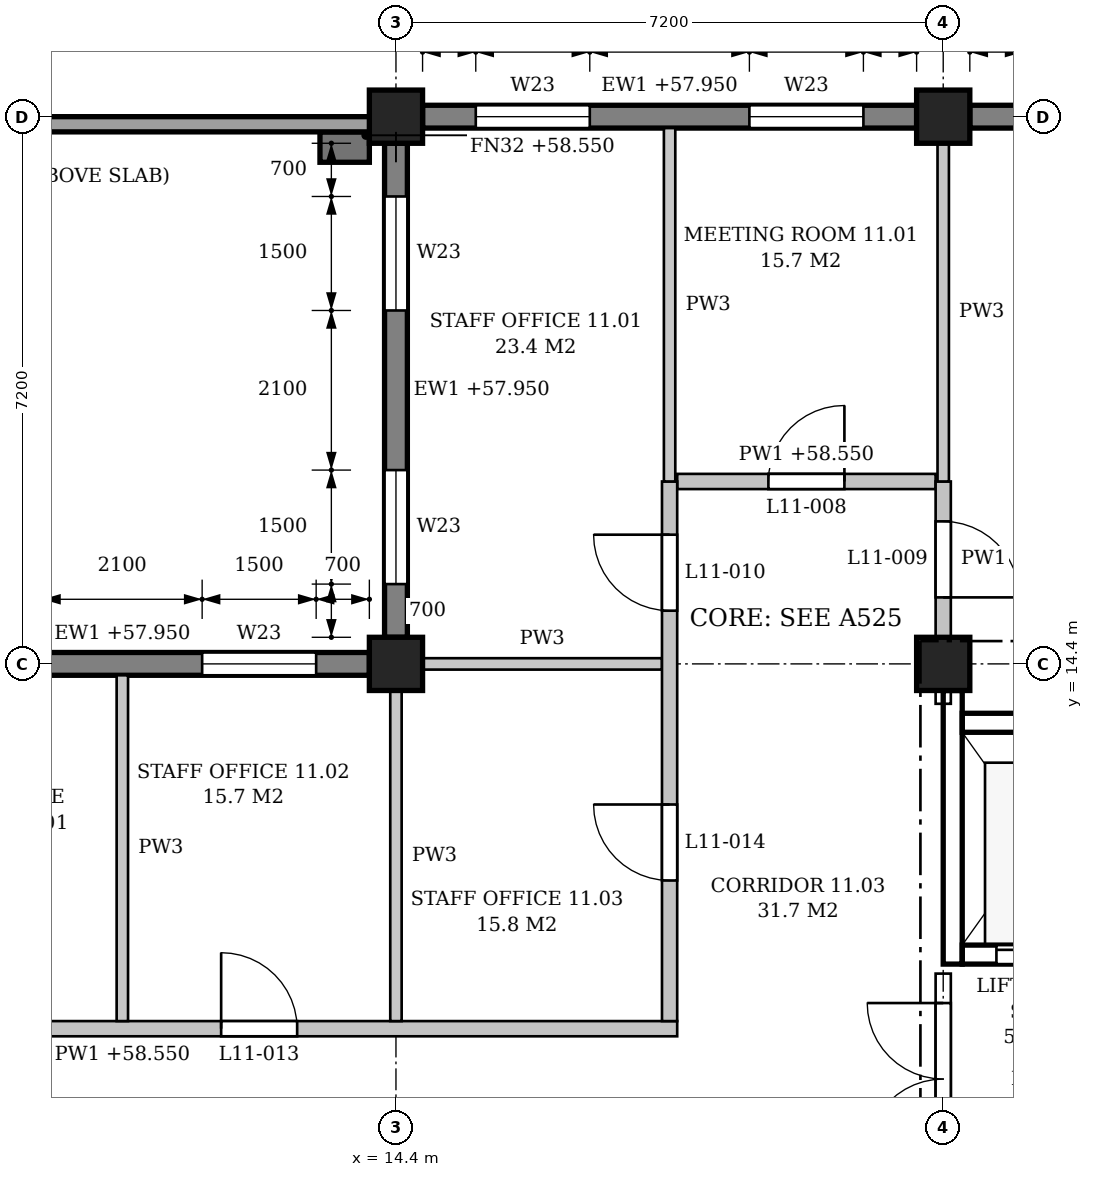
"""IFC4 building model, lengths in metres.
Left out: names, types, materials, properties, quantities, classifications, styles, units other than length and angle.
Written with IfcOpenShell. Run it as: python <this file> out.ifc"""

import sys

from ifc_helpers import new_model, si_unit, direction, frame, frame_2d, origin, origin_2d, place, context, subcontext, project, spatial, polyline, rectangle, outline, extrude, element, fill, save


model = new_model("IFC4")
c1 = context("Model", 3, precision=1e-05, world=origin(), true_north=direction((0.0, 1.0)))
c2 = subcontext(c1, "Body", "Model", "MODEL_VIEW")
j1 = project(units=[si_unit("LENGTHUNIT", "METRE"), si_unit("PLANEANGLEUNIT", "RADIAN")], contexts=[c1])
p1 = place(None, origin())
s1 = spatial("IfcSite", under=j1, at=p1, CompositionType="ELEMENT")
p2 = place(p1, origin())
s2 = spatial("IfcBuilding", under=s1, at=p2, CompositionType="ELEMENT")
p3 = place(p2, frame((0.0, 0.0, 54.3)))
s3 = spatial("IfcBuildingStorey", under=s2, at=p3, CompositionType="ELEMENT", Elevation=54.3)
for number, where, z_axis, x_axis in (
    (1, (14.4, 14.4, 0.0), (0.0, 0.0, 1.0), (1.0, 0.0, 0.0)),
    (2, (14.4, 21.6, 0.0), (0.0, 0.0, 1.0), (1.0, 0.0, 0.0)),
    (3, (21.6, 14.4, 0.0), (0.0, 0.0, 1.0), (1.0, 0.0, 0.0)),
    (4, (21.6, 21.6, 0.0), (0.0, 0.0, 1.0), (1.0, 0.0, 0.0)),
):
    element("IfcColumn", number, at=place(p3, frame(where, z_axis=z_axis, x_axis=x_axis)), inside=s3, PredefinedType="COLUMN", context=c2, shape_type="SweptSolid", body=[
        extrude(rectangle(XDim=0.7, YDim=0.7, at=origin_2d()), origin(), (0.0, 0.0, 1.0), 4.5),
    ])
p4 = place(p3, frame((0.2, 21.5, 0.0), z_axis=(0.0, 0.0, 1.0), x_axis=(1.0, 0.0, 0.0)))
e5 = element("IfcWall", 5, at=p4, inside=s3, PredefinedType="STANDARD", context=c2, shape_type="SweptSolid", body=[
    extrude(rectangle(XDim=14.05, YDim=0.2, at=frame_2d((7.025, 0.0))), origin(), (0.0, 0.0, 1.0), 0.15),
])
p5 = place(p3, frame((28.45, 21.6, 0.0), z_axis=(0.0, 0.0, 1.0), x_axis=(-1.0, 0.0, 0.0)))
e6 = element("IfcWall", 6, at=p5, inside=s3, PredefinedType="STANDARD", context=c2, shape_type="SweptSolid", body=[
    extrude(rectangle(XDim=6.5, YDim=0.3, at=frame_2d((3.25, 0.0))), origin(), (0.0, 0.0, 1.0), 3.65),
])
p6 = place(p5, frame((0.7, 0.0, 0.9)))
e7 = element("IfcOpeningElement", 7, at=p6, cuts=e6, PredefinedType="OPENING", context=c2, shape_type="SweptSolid", body=[
    extrude(outline(polyline([(0.0, 0.0), (1.5, 0.0), (1.5, 1.95), (0.75, 2.7), (0.0, 1.95), (0.0, 0.0)])), frame((0.0, 0.16, 0.0), z_axis=(0.0, -1.0, 0.0), x_axis=(1.0, 0.0, 0.0)), (0.0, 0.0, 1.0), 0.32),
])
p7 = place(p5, frame((4.3, 0.0, 0.9)))
e8 = element("IfcOpeningElement", 8, at=p7, cuts=e6, PredefinedType="OPENING", context=c2, shape_type="SweptSolid", body=[
    extrude(outline(polyline([(0.0, 0.0), (1.5, 0.0), (1.5, 1.95), (0.75, 2.7), (0.0, 1.95), (0.0, 0.0)])), frame((0.0, 0.16, 0.0), z_axis=(0.0, -1.0, 0.0), x_axis=(1.0, 0.0, 0.0)), (0.0, 0.0, 1.0), 0.32),
])
p8 = place(p3, frame((21.25, 21.6, 0.0), z_axis=(0.0, 0.0, 1.0), x_axis=(-1.0, 0.0, 0.0)))
e9 = element("IfcWall", 9, at=p8, inside=s3, PredefinedType="STANDARD", context=c2, shape_type="SweptSolid", body=[
    extrude(rectangle(XDim=6.5, YDim=0.3, at=frame_2d((3.25, 0.0))), origin(), (0.0, 0.0, 1.0), 3.65),
])
p9 = place(p8, frame((0.7, 0.0, 0.9)))
e10 = element("IfcOpeningElement", 10, at=p9, cuts=e9, PredefinedType="OPENING", context=c2, shape_type="SweptSolid", body=[
    extrude(outline(polyline([(0.0, 0.0), (1.5, 0.0), (1.5, 1.95), (0.75, 2.7), (0.0, 1.95), (0.0, 0.0)])), frame((0.0, 0.16, 0.0), z_axis=(0.0, -1.0, 0.0), x_axis=(1.0, 0.0, 0.0)), (0.0, 0.0, 1.0), 0.32),
])
p10 = place(p8, frame((4.3, 0.0, 0.9)))
e11 = element("IfcOpeningElement", 11, at=p10, cuts=e9, PredefinedType="OPENING", context=c2, shape_type="SweptSolid", body=[
    extrude(outline(polyline([(0.0, 0.0), (1.5, 0.0), (1.5, 1.95), (0.75, 2.7), (0.0, 1.95), (0.0, 0.0)])), frame((0.0, 0.16, 0.0), z_axis=(0.0, -1.0, 0.0), x_axis=(1.0, 0.0, 0.0)), (0.0, 0.0, 1.0), 0.32),
])
p11 = place(p3, frame((14.05, 14.4, 0.0), z_axis=(0.0, 0.0, 1.0), x_axis=(-1.0, 0.0, 0.0)))
e12 = element("IfcWall", 12, at=p11, inside=s3, PredefinedType="STANDARD", context=c2, shape_type="SweptSolid", body=[
    extrude(rectangle(XDim=6.5, YDim=0.3, at=frame_2d((3.25, 0.0))), origin(), (0.0, 0.0, 1.0), 3.65),
])
p12 = place(p11, frame((0.7, 0.0, 0.9)))
e13 = element("IfcOpeningElement", 13, at=p12, cuts=e12, PredefinedType="OPENING", context=c2, shape_type="SweptSolid", body=[
    extrude(outline(polyline([(0.0, 0.0), (1.5, 0.0), (1.5, 1.95), (0.75, 2.7), (0.0, 1.95), (0.0, 0.0)])), frame((0.0, 0.16, 0.0), z_axis=(0.0, -1.0, 0.0), x_axis=(1.0, 0.0, 0.0)), (0.0, 0.0, 1.0), 0.32),
])
p13 = place(p11, frame((4.3, 0.0, 0.9)))
e14 = element("IfcOpeningElement", 14, at=p13, cuts=e12, PredefinedType="OPENING", context=c2, shape_type="SweptSolid", body=[
    extrude(outline(polyline([(0.0, 0.0), (1.5, 0.0), (1.5, 1.95), (0.75, 2.7), (0.0, 1.95), (0.0, 0.0)])), frame((0.0, 0.16, 0.0), z_axis=(0.0, -1.0, 0.0), x_axis=(1.0, 0.0, 0.0)), (0.0, 0.0, 1.0), 0.32),
])
p14 = place(p3, frame((14.4, 14.75, 0.0), z_axis=(0.0, 0.0, 1.0), x_axis=(0.0, 1.0, 0.0)))
e15 = element("IfcWall", 15, at=p14, inside=s3, PredefinedType="STANDARD", context=c2, shape_type="SweptSolid", body=[
    extrude(rectangle(XDim=6.5, YDim=0.3, at=frame_2d((3.25, 0.0))), origin(), (0.0, 0.0, 1.0), 3.65),
])
p15 = place(p14, frame((0.7, 0.0, 0.9)))
e16 = element("IfcOpeningElement", 16, at=p15, cuts=e15, PredefinedType="OPENING", context=c2, shape_type="SweptSolid", body=[
    extrude(outline(polyline([(0.0, 0.0), (1.5, 0.0), (1.5, 1.95), (0.75, 2.7), (0.0, 1.95), (0.0, 0.0)])), frame((0.0, 0.16, 0.0), z_axis=(0.0, -1.0, 0.0), x_axis=(1.0, 0.0, 0.0)), (0.0, 0.0, 1.0), 0.32),
])
p16 = place(p14, frame((4.3, 0.0, 0.9)))
e17 = element("IfcOpeningElement", 17, at=p16, cuts=e15, PredefinedType="OPENING", context=c2, shape_type="SweptSolid", body=[
    extrude(outline(polyline([(0.0, 0.0), (1.5, 0.0), (1.5, 1.95), (0.75, 2.7), (0.0, 1.95), (0.0, 0.0)])), frame((0.0, 0.16, 0.0), z_axis=(0.0, -1.0, 0.0), x_axis=(1.0, 0.0, 0.0)), (0.0, 0.0, 1.0), 0.32),
])
p17 = place(p3, frame((14.05, 21.2, 0.0), z_axis=(0.0, 0.0, 1.0), x_axis=(-1.0, 0.0, 0.0)))
e18 = element("IfcWall", 18, at=p17, inside=s3, PredefinedType="POLYGONAL", context=c2, shape_type="SweptSolid", body=[
    extrude(outline(polyline([(0.65, 0.0), (0.65, 4.025), (0.5, 4.25), (0.0, 4.25), (0.0, 0.0), (0.65, 0.0)])), frame((0.0, 0.2, 0.0), z_axis=(0.0, -1.0, 0.0), x_axis=(1.0, 0.0, 0.0)), (0.0, 0.0, 1.0), 0.4),
])
p18 = place(p3, frame((21.725, 10.45, -0.25), z_axis=(0.0, 0.0, 1.0), x_axis=(0.0, 1.0, 0.0)))
e19 = element("IfcWall", 19, at=p18, inside=s3, PredefinedType="SHEAR", context=c2, shape_type="SweptSolid", body=[
    extrude(rectangle(XDim=3.6, YDim=0.25, at=frame_2d((1.8, 0.0))), origin(), (0.0, 0.0, 1.0), 3.8),
])
p19 = place(p3, frame((21.85, 10.575, -0.25), z_axis=(0.0, 0.0, 1.0), x_axis=(1.0, 0.0, 0.0)))
e20 = element("IfcWall", 20, at=p19, inside=s3, PredefinedType="SHEAR", context=c2, shape_type="SweptSolid", body=[
    extrude(rectangle(XDim=2.0, YDim=0.25, at=frame_2d((1.0, 0.0))), origin(), (0.0, 0.0, 1.0), 4.5),
])
p20 = place(p19, frame((0.45, 0.0, 0.25)))
e21 = element("IfcOpeningElement", 21, at=p20, cuts=e20, PredefinedType="OPENING", context=c2, shape_type="SweptSolid", body=[
    extrude(rectangle(XDim=1.1, YDim=2.1, at=frame_2d((0.55, 1.05))), frame((0.0, 0.135, 0.0), z_axis=(0.0, -1.0, 0.0), x_axis=(1.0, 0.0, 0.0)), (0.0, 0.0, 1.0), 0.27),
])
p21 = place(p3, frame((21.85, 13.625, -0.25), z_axis=(0.0, 0.0, 1.0), x_axis=(1.0, 0.0, 0.0)))
e22 = element("IfcWall", 22, at=p21, inside=s3, PredefinedType="SHEAR", context=c2, shape_type="SweptSolid", body=[
    extrude(rectangle(XDim=2.0, YDim=0.25, at=frame_2d((1.0, 0.0))), origin(), (0.0, 0.0, 1.0), 4.5),
])
p22 = place(p3, frame((3.5, 9.6, 0.0), z_axis=(0.0, 0.0, 1.0), x_axis=(1.0, 0.0, 0.0)))
e23 = element("IfcWall", 23, at=p22, inside=s3, PredefinedType="PARTITIONING", context=c2, shape_type="SweptSolid", body=[
    extrude(outline(polyline([(0.0, 0.0), (14.6, 0.0), (14.6, 4.25), (11.125, 4.25), (11.125, 3.55), (10.675, 3.55), (10.675, 4.25), (3.925, 4.25), (3.925, 3.55), (3.475, 3.55), (3.475, 4.25), (0.0, 4.25), (0.0, 0.0)])), frame((0.0, 0.1, 0.0), z_axis=(0.0, -1.0, 0.0), x_axis=(1.0, 0.0, 0.0)), (0.0, 0.0, 1.0), 0.2),
])
p23 = place(p22, frame((2.7, 0.0, 0.0)))
e24 = element("IfcOpeningElement", 24, at=p23, cuts=e23, PredefinedType="OPENING", context=c2, shape_type="SweptSolid", body=[
    extrude(rectangle(XDim=2.0, YDim=2.1, at=frame_2d((1.0, 1.05))), frame((0.0, 0.11, 0.0), z_axis=(0.0, -1.0, 0.0), x_axis=(1.0, 0.0, 0.0)), (0.0, 0.0, 1.0), 0.22),
])
p24 = place(p22, frame((8.6, 0.0, 0.0)))
e25 = element("IfcOpeningElement", 25, at=p24, cuts=e23, PredefinedType="OPENING", context=c2, shape_type="SweptSolid", body=[
    extrude(rectangle(XDim=1.0, YDim=2.1, at=frame_2d((0.5, 1.05))), frame((0.0, 0.11, 0.0), z_axis=(0.0, -1.0, 0.0), x_axis=(1.0, 0.0, 0.0)), (0.0, 0.0, 1.0), 0.22),
])
p25 = place(p3, frame((14.75, 14.4, 0.0), z_axis=(0.0, 0.0, 1.0), x_axis=(1.0, 0.0, 0.0)))
e26 = element("IfcWall", 26, at=p25, inside=s3, PredefinedType="PARTITIONING", context=c2, shape_type="SweptSolid", body=[
    extrude(rectangle(XDim=3.15, YDim=0.15, at=frame_2d((1.575, 0.0))), origin(), (0.0, 0.0, 1.0), 3.55),
])
p26 = place(p3, frame((18.1, 16.8, 0.0), z_axis=(0.0, 0.0, 1.0), x_axis=(1.0, 0.0, 0.0)))
e27 = element("IfcWall", 27, at=p26, inside=s3, PredefinedType="PARTITIONING", context=c2, shape_type="SweptSolid", body=[
    extrude(outline(polyline([(0.0, 0.0), (3.4, 0.0), (3.4, 3.55), (3.275, 3.55), (3.275, 4.25), (0.0, 4.25), (0.0, 0.0)])), frame((0.0, 0.1, 0.0), z_axis=(0.0, -1.0, 0.0), x_axis=(1.0, 0.0, 0.0)), (0.0, 0.0, 1.0), 0.2),
])
p27 = place(p26, frame((1.2, 0.0, 0.0)))
e28 = element("IfcOpeningElement", 28, at=p27, cuts=e27, PredefinedType="OPENING", context=c2, shape_type="SweptSolid", body=[
    extrude(rectangle(XDim=1.0, YDim=2.1, at=frame_2d((0.5, 1.05))), frame((0.0, 0.11, 0.0), z_axis=(0.0, -1.0, 0.0), x_axis=(1.0, 0.0, 0.0)), (0.0, 0.0, 1.0), 0.22),
])
p28 = place(p3, frame((10.8, 9.7, 0.0), z_axis=(0.0, 0.0, 1.0), x_axis=(0.0, 1.0, 0.0)))
e29 = element("IfcWall", 29, at=p28, inside=s3, PredefinedType="PARTITIONING", context=c2, shape_type="SweptSolid", body=[
    extrude(rectangle(XDim=4.55, YDim=0.15, at=frame_2d((2.275, 0.0))), origin(), (0.0, 0.0, 1.0), 3.55),
])
p29 = place(p3, frame((14.4, 9.7, 0.0), z_axis=(0.0, 0.0, 1.0), x_axis=(0.0, 1.0, 0.0)))
e30 = element("IfcWall", 30, at=p29, inside=s3, PredefinedType="PARTITIONING", context=c2, shape_type="SweptSolid", body=[
    extrude(rectangle(XDim=4.35, YDim=0.15, at=frame_2d((2.175, 0.0))), origin(), (0.0, 0.0, 1.0), 3.55),
])
p30 = place(p3, frame((18.0, 9.7, 0.0), z_axis=(0.0, 0.0, 1.0), x_axis=(0.0, 1.0, 0.0)))
e31 = element("IfcWall", 31, at=p30, inside=s3, PredefinedType="PARTITIONING", context=c2, shape_type="SweptSolid", body=[
    extrude(outline(polyline([(0.0, 0.0), (7.1, 0.0), (7.1, 4.25), (4.925, 4.25), (4.925, 3.55), (4.475, 3.55), (4.475, 4.25), (0.0, 4.25), (0.0, 0.0)])), frame((0.0, 0.1, 0.0), z_axis=(0.0, -1.0, 0.0), x_axis=(1.0, 0.0, 0.0)), (0.0, 0.0, 1.0), 0.2),
])
p31 = place(p30, frame((5.4, 0.0, 0.0)))
e32 = element("IfcOpeningElement", 32, at=p31, cuts=e31, PredefinedType="OPENING", context=c2, shape_type="SweptSolid", body=[
    extrude(rectangle(XDim=1.0, YDim=2.1, at=frame_2d((0.5, 1.05))), frame((0.0, 0.11, 0.0), z_axis=(0.0, -1.0, 0.0), x_axis=(1.0, 0.0, 0.0)), (0.0, 0.0, 1.0), 0.22),
])
p32 = place(p30, frame((1.85, 0.0, 0.0)))
e33 = element("IfcOpeningElement", 33, at=p32, cuts=e31, PredefinedType="OPENING", context=c2, shape_type="SweptSolid", body=[
    extrude(rectangle(XDim=1.0, YDim=2.1, at=frame_2d((0.5, 1.05))), frame((0.0, 0.11, 0.0), z_axis=(0.0, -1.0, 0.0), x_axis=(1.0, 0.0, 0.0)), (0.0, 0.0, 1.0), 0.22),
])
p33 = place(p3, frame((18.0, 16.8, 0.0), z_axis=(0.0, 0.0, 1.0), x_axis=(0.0, 1.0, 0.0)))
e34 = element("IfcWall", 34, at=p33, inside=s3, PredefinedType="PARTITIONING", context=c2, shape_type="SweptSolid", body=[
    extrude(rectangle(XDim=4.65, YDim=0.15, at=frame_2d((2.325, 0.0))), origin(), (0.0, 0.0, 1.0), 3.55),
])
p34 = place(p3, frame((21.6, 7.55, 0.0), z_axis=(0.0, 0.0, 1.0), x_axis=(0.0, 1.0, 0.0)))
e35 = element("IfcWall", 35, at=p34, inside=s3, PredefinedType="PARTITIONING", context=c2, shape_type="SweptSolid", body=[
    extrude(rectangle(XDim=2.775, YDim=0.2, at=frame_2d((1.387, 0.0))), origin(), (0.0, 0.0, 1.0), 3.55),
])
p35 = place(p34, frame((0.387, 0.0, 0.0)))
e36 = element("IfcOpeningElement", 36, at=p35, cuts=e35, PredefinedType="OPENING", context=c2, shape_type="SweptSolid", body=[
    extrude(rectangle(XDim=2.0, YDim=2.4, at=frame_2d((1.0, 1.2))), frame((0.0, 0.11, 0.0), z_axis=(0.0, -1.0, 0.0), x_axis=(1.0, 0.0, 0.0)), (0.0, 0.0, 1.0), 0.22),
])
p36 = place(p3, frame((21.6, 13.875, 0.0), z_axis=(0.0, 0.0, 1.0), x_axis=(0.0, 1.0, 0.0)))
e37 = element("IfcWall", 37, at=p36, inside=s3, PredefinedType="PARTITIONING", context=c2, shape_type="SweptSolid", body=[
    extrude(rectangle(XDim=0.175, YDim=0.2, at=frame_2d((0.087, 0.0))), origin(), (0.0, 0.0, 1.0), 3.55),
])
p37 = place(p3, frame((21.6, 14.75, 0.0), z_axis=(0.0, 0.0, 1.0), x_axis=(0.0, 1.0, 0.0)))
e38 = element("IfcWall", 38, at=p37, inside=s3, PredefinedType="PARTITIONING", context=c2, shape_type="SweptSolid", body=[
    extrude(rectangle(XDim=2.05, YDim=0.2, at=frame_2d((1.025, 0.0))), origin(), (0.0, 0.0, 1.0), 3.55),
])
p38 = place(p37, frame((0.525, 0.0, 0.0)))
e39 = element("IfcOpeningElement", 39, at=p38, cuts=e38, PredefinedType="OPENING", context=c2, shape_type="SweptSolid", body=[
    extrude(rectangle(XDim=1.0, YDim=2.1, at=frame_2d((0.5, 1.05))), frame((0.0, 0.11, 0.0), z_axis=(0.0, -1.0, 0.0), x_axis=(1.0, 0.0, 0.0)), (0.0, 0.0, 1.0), 0.22),
])
p39 = place(p3, frame((21.6, 16.8, 0.0), z_axis=(0.0, 0.0, 1.0), x_axis=(0.0, 1.0, 0.0)))
e40 = element("IfcWall", 40, at=p39, inside=s3, PredefinedType="PARTITIONING", context=c2, shape_type="SweptSolid", body=[
    extrude(rectangle(XDim=4.45, YDim=0.15, at=frame_2d((2.225, 0.0))), origin(), (0.0, 0.0, 1.0), 3.55),
])
p40 = place(p9, origin())
e41 = element("IfcWindow", 41, at=p40, inside=s3, PartitioningType="SINGLE_PANEL", PredefinedType="WINDOW", context=c2, shape_type="SweptSolid", body=[
    extrude(outline(polyline([(0.0, 0.0), (1.5, 0.0), (1.5, 1.95), (0.75, 2.7), (0.0, 1.95), (0.0, 0.0)])), frame((0.0, 0.03, 0.0), z_axis=(0.0, -1.0, 0.0), x_axis=(1.0, 0.0, 0.0)), (0.0, 0.0, 1.0), 0.06),
])
fill(e10, e41)
p41 = place(p10, origin())
e42 = element("IfcWindow", 42, at=p41, inside=s3, PartitioningType="SINGLE_PANEL", PredefinedType="WINDOW", context=c2, shape_type="SweptSolid", body=[
    extrude(outline(polyline([(0.0, 0.0), (1.5, 0.0), (1.5, 1.95), (0.75, 2.7), (0.0, 1.95), (0.0, 0.0)])), frame((0.0, 0.03, 0.0), z_axis=(0.0, -1.0, 0.0), x_axis=(1.0, 0.0, 0.0)), (0.0, 0.0, 1.0), 0.06),
])
fill(e11, e42)
p42 = place(p12, origin())
e43 = element("IfcWindow", 43, at=p42, inside=s3, PartitioningType="SINGLE_PANEL", PredefinedType="WINDOW", context=c2, shape_type="SweptSolid", body=[
    extrude(outline(polyline([(0.0, 0.0), (1.5, 0.0), (1.5, 1.95), (0.75, 2.7), (0.0, 1.95), (0.0, 0.0)])), frame((0.0, 0.03, 0.0), z_axis=(0.0, -1.0, 0.0), x_axis=(1.0, 0.0, 0.0)), (0.0, 0.0, 1.0), 0.06),
])
fill(e13, e43)
p43 = place(p15, origin())
e44 = element("IfcWindow", 44, at=p43, inside=s3, PartitioningType="SINGLE_PANEL", PredefinedType="WINDOW", context=c2, shape_type="SweptSolid", body=[
    extrude(outline(polyline([(0.0, 0.0), (1.5, 0.0), (1.5, 1.95), (0.75, 2.7), (0.0, 1.95), (0.0, 0.0)])), frame((0.0, 0.03, 0.0), z_axis=(0.0, -1.0, 0.0), x_axis=(1.0, 0.0, 0.0)), (0.0, 0.0, 1.0), 0.06),
])
fill(e16, e44)
p44 = place(p16, origin())
e45 = element("IfcWindow", 45, at=p44, inside=s3, PartitioningType="SINGLE_PANEL", PredefinedType="WINDOW", context=c2, shape_type="SweptSolid", body=[
    extrude(outline(polyline([(0.0, 0.0), (1.5, 0.0), (1.5, 1.95), (0.75, 2.7), (0.0, 1.95), (0.0, 0.0)])), frame((0.0, 0.03, 0.0), z_axis=(0.0, -1.0, 0.0), x_axis=(1.0, 0.0, 0.0)), (0.0, 0.0, 1.0), 0.06),
])
fill(e17, e45)
p45 = place(p20, origin())
e46 = element("IfcDoor", 46, at=p45, inside=s3, OperationType="SLIDING_TO_LEFT", PredefinedType="DOOR", context=c2, shape_type="SweptSolid", body=[
    extrude(rectangle(XDim=1.1, YDim=2.1, at=frame_2d((0.55, 1.05))), frame((0.0, 0.025, 0.0), z_axis=(0.0, -1.0, 0.0), x_axis=(1.0, 0.0, 0.0)), (0.0, 0.0, 1.0), 0.05),
])
fill(e21, e46)
p46 = place(p35, origin())
e47 = element("IfcDoor", 47, at=p46, inside=s3, OperationType="DOUBLE_DOOR_SINGLE_SWING", PredefinedType="DOOR", context=c2, shape_type="SweptSolid", body=[
    extrude(rectangle(XDim=2.0, YDim=2.4, at=frame_2d((1.0, 1.2))), frame((0.0, 0.025, 0.0), z_axis=(0.0, -1.0, 0.0), x_axis=(1.0, 0.0, 0.0)), (0.0, 0.0, 1.0), 0.05),
])
fill(e36, e47)
p47 = place(p27, origin())
e48 = element("IfcDoor", 48, at=p47, inside=s3, OperationType="SINGLE_SWING_RIGHT", PredefinedType="DOOR", context=c2, shape_type="SweptSolid", body=[
    extrude(rectangle(XDim=1.0, YDim=2.1, at=frame_2d((0.5, 1.05))), frame((0.0, 0.025, 0.0), z_axis=(0.0, -1.0, 0.0), x_axis=(1.0, 0.0, 0.0)), (0.0, 0.0, 1.0), 0.05),
])
fill(e28, e48)
p48 = place(p38, frame((1.0, 0.0, 0.0), z_axis=(0.0, 0.0, 1.0), x_axis=(-1.0, 0.0, 0.0)))
e49 = element("IfcDoor", 49, at=p48, inside=s3, OperationType="SINGLE_SWING_RIGHT", PredefinedType="DOOR", context=c2, shape_type="SweptSolid", body=[
    extrude(rectangle(XDim=1.0, YDim=2.1, at=frame_2d((0.5, 1.05))), frame((0.0, 0.025, 0.0), z_axis=(0.0, -1.0, 0.0), x_axis=(1.0, 0.0, 0.0)), (0.0, 0.0, 1.0), 0.05),
])
fill(e39, e49)
p49 = place(p31, origin())
e50 = element("IfcDoor", 50, at=p49, inside=s3, OperationType="SINGLE_SWING_RIGHT", PredefinedType="DOOR", context=c2, shape_type="SweptSolid", body=[
    extrude(rectangle(XDim=1.0, YDim=2.1, at=frame_2d((0.5, 1.05))), frame((0.0, 0.025, 0.0), z_axis=(0.0, -1.0, 0.0), x_axis=(1.0, 0.0, 0.0)), (0.0, 0.0, 1.0), 0.05),
])
fill(e32, e50)
p50 = place(p24, origin())
e51 = element("IfcDoor", 51, at=p50, inside=s3, OperationType="SINGLE_SWING_LEFT", PredefinedType="DOOR", context=c2, shape_type="SweptSolid", body=[
    extrude(rectangle(XDim=1.0, YDim=2.1, at=frame_2d((0.5, 1.05))), frame((0.0, 0.025, 0.0), z_axis=(0.0, -1.0, 0.0), x_axis=(1.0, 0.0, 0.0)), (0.0, 0.0, 1.0), 0.05),
])
fill(e25, e51)
p51 = place(p32, origin())
e52 = element("IfcDoor", 52, at=p51, inside=s3, OperationType="SINGLE_SWING_RIGHT", PredefinedType="DOOR", context=c2, shape_type="SweptSolid", body=[
    extrude(rectangle(XDim=1.0, YDim=2.1, at=frame_2d((0.5, 1.05))), frame((0.0, 0.025, 0.0), z_axis=(0.0, -1.0, 0.0), x_axis=(1.0, 0.0, 0.0)), (0.0, 0.0, 1.0), 0.05),
])
fill(e33, e52)
save(model, sys.argv[1])
